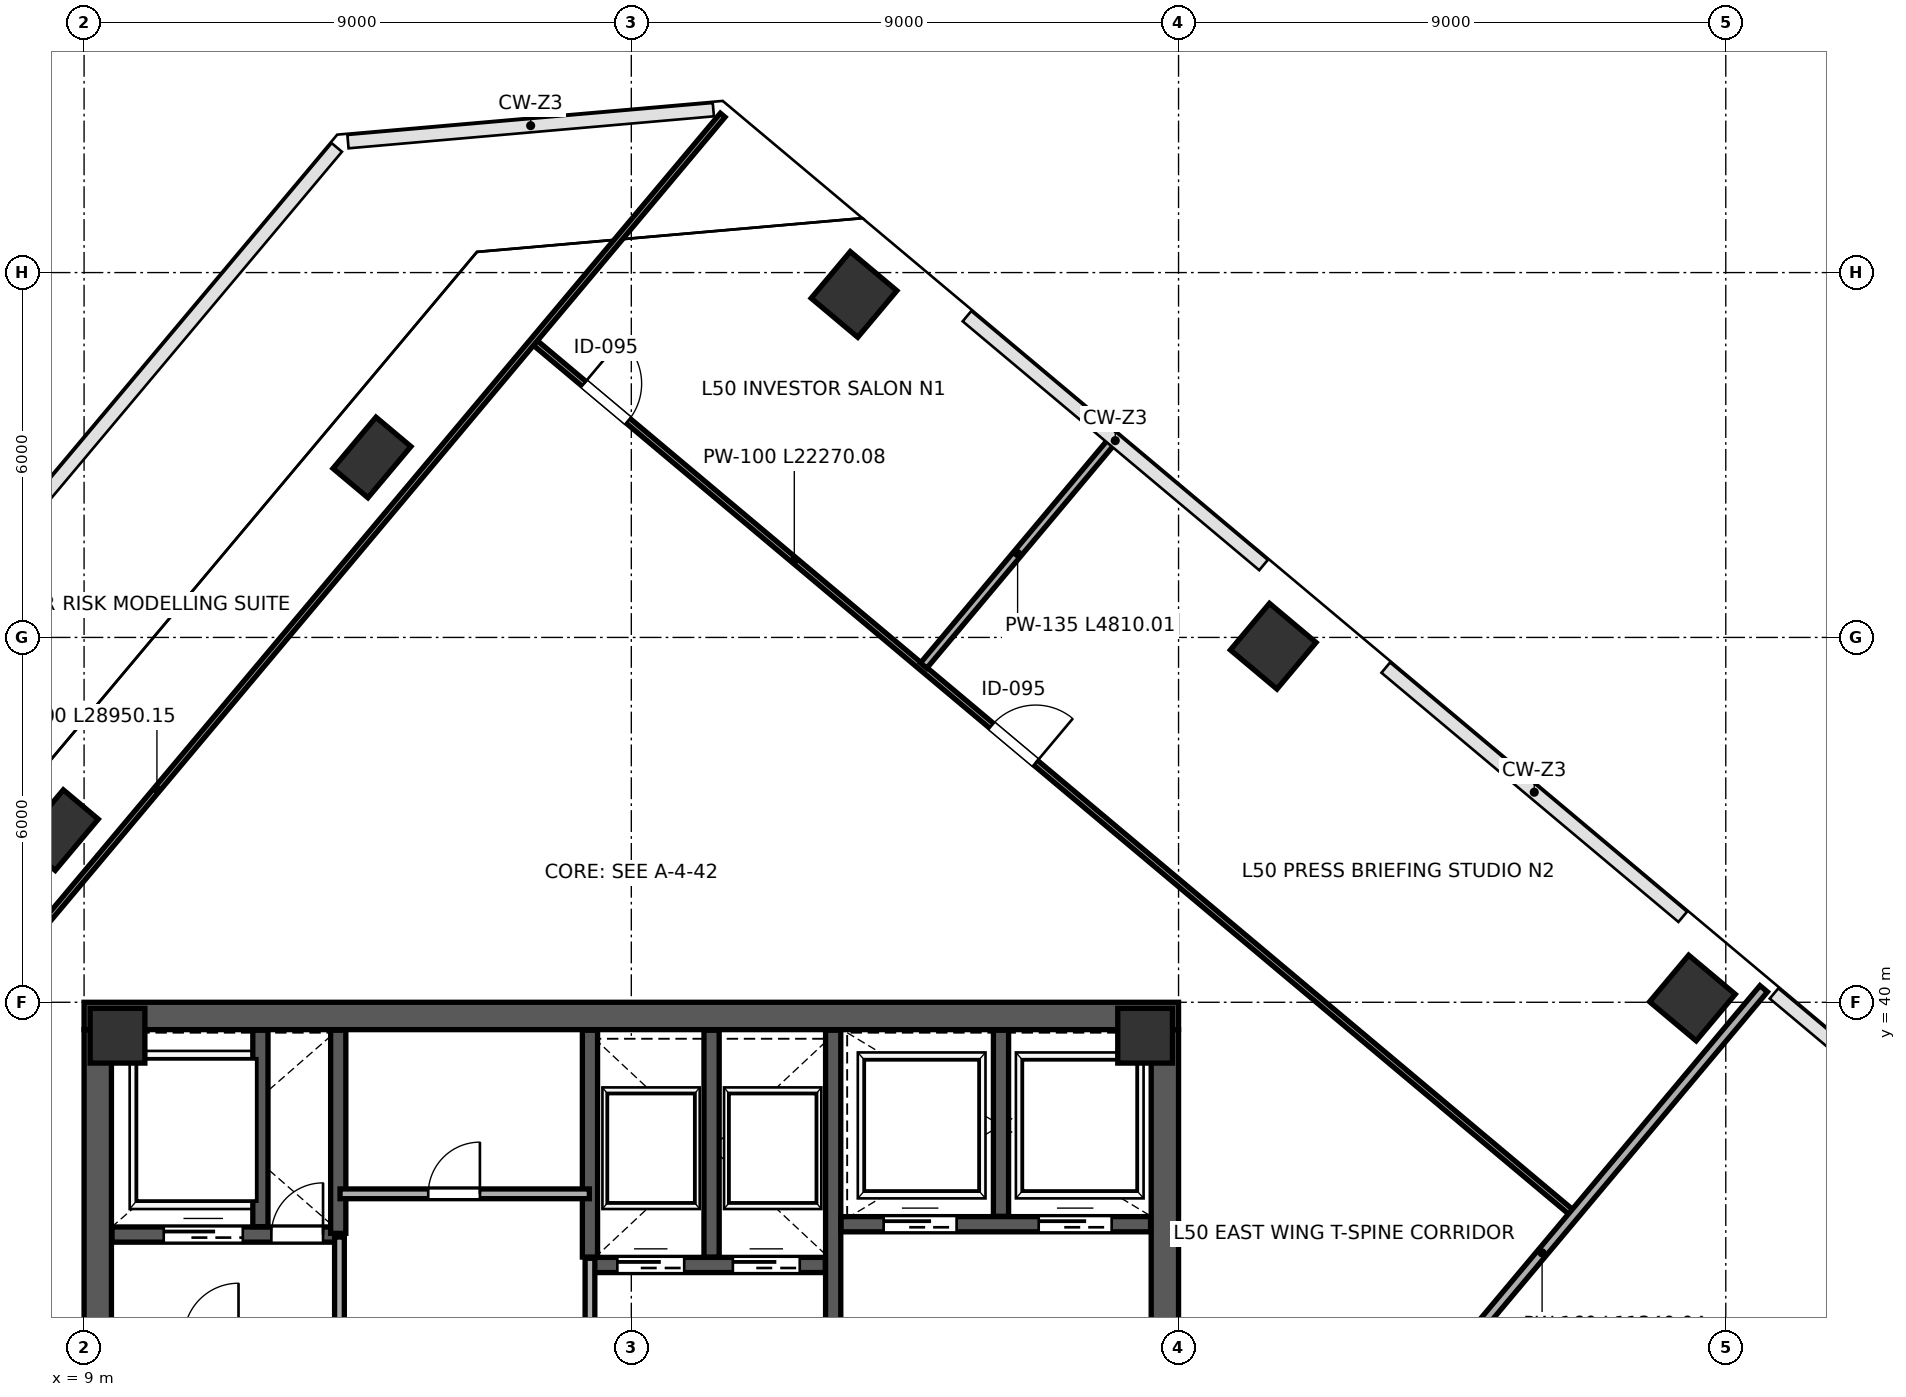
"""IFC4 building model, lengths in metres.
Left out: names, types, materials, properties, quantities, classifications, styles, units other than length and angle.
Written with IfcOpenShell. Run it as: python <this file> out.ifc"""

import sys

from ifc_helpers import new_model, si_unit, direction, frame, frame_2d, origin, origin_2d, place, context, subcontext, project, spatial, rectangle, extrude, clip, halfspace, source, transform, mapped, element, fill, save


model = new_model("IFC4")
c1 = context("Model", 3, precision=1e-05, world=origin(), true_north=direction((0.0, 1.0)))
c2 = subcontext(c1, "Body", "Model", "MODEL_VIEW")
j1 = project(units=[si_unit("LENGTHUNIT", "METRE"), si_unit("PLANEANGLEUNIT", "RADIAN")], contexts=[c1])
p1 = place(None, origin())
s1 = spatial("IfcSite", under=j1, at=p1, CompositionType="ELEMENT")
p2 = place(p1, origin())
s2 = spatial("IfcBuilding", under=s1, at=p2, CompositionType="ELEMENT")
p3 = place(p2, frame((0.0, 0.0, 224.8)))
s3 = spatial("IfcBuildingStorey", under=s2, at=p3, CompositionType="ELEMENT", Elevation=224.8)
m1 = source(origin(), c2, "Body", "SweptSolid", [
    extrude(rectangle(XDim=0.9, YDim=0.9, at=origin_2d()), origin(), (0.0, 0.0, 1.0), 4.198),
])
for number, where, z_axis, x_axis in (
    (1, (9.55, 39.45, 0.001), (0.0, 0.0, 1.0), (1.0, 0.0, 0.0)),
    (2, (26.45, 39.45, 0.001), (0.0, 0.0, 1.0), (1.0, 0.0, 0.0)),
):
    element("IfcColumn", number, at=place(p3, frame(where, z_axis=z_axis, x_axis=x_axis)), inside=s3, PredefinedType="COLUMN", context=c2, shape_type="MappedRepresentation", body=[
        mapped(m1, transform((0.0, 0.0, 0.0), scale=1.0)),
    ])
p4 = place(p3, frame((21.663, 51.64, 0.0), z_axis=(0.199857053228, -0.006037289154, 0.979806465285), x_axis=(-0.652650442084, -0.74667859259, 0.128524238241)))
e3 = element("IfcColumn", 3, at=p4, inside=s3, PredefinedType="COLUMN", context=c2, shape_type="Clipping", body=[
    clip(clip(extrude(rectangle(XDim=1.0, YDim=1.0, at=origin_2d()), origin(), (0.0, 0.0, 1.0), 4.287), halfspace(frame((0.0, 0.0, 0.145), z_axis=(0.0, 0.0, -1.0), x_axis=(1.0, 0.0, 0.0)), False)), halfspace(frame((0.0, 0.0, 4.142), z_axis=(0.0, 0.0, 1.0), x_axis=(1.0, 0.0, 0.0)), False)),
])
p5 = place(p3, frame((28.557, 45.855, 0.0), z_axis=(0.140479821095, -0.0754619954, 0.987203579367), x_axis=(-0.921521408534, -0.374555209537, 0.102502139601)))
e4 = element("IfcColumn", 4, at=p5, inside=s3, PredefinedType="COLUMN", context=c2, shape_type="Clipping", body=[
    clip(clip(extrude(rectangle(XDim=1.0, YDim=1.0, at=origin_2d()), origin(), (0.0, 0.0, 1.0), 4.254), halfspace(frame((0.0, 0.0, 0.115), z_axis=(0.0, 0.0, -1.0), x_axis=(1.0, 0.0, 0.0)), False)), halfspace(frame((0.0, 0.0, 4.14), z_axis=(0.0, 0.0, 1.0), x_axis=(1.0, 0.0, 0.0)), False)),
])
p6 = place(p3, frame((35.451, 40.07, 0.0), z_axis=(0.079575811303, -0.144704141015, 0.986269943691), x_axis=(-0.976727213265, 0.186375919699, 0.106150682633)))
e5 = element("IfcColumn", 5, at=p6, inside=s3, PredefinedType="COLUMN", context=c2, shape_type="Clipping", body=[
    clip(clip(extrude(rectangle(XDim=1.0, YDim=1.0, at=origin_2d()), origin(), (0.0, 0.0, 1.0), 4.258), halfspace(frame((0.0, 0.0, 0.119), z_axis=(0.0, 0.0, -1.0), x_axis=(1.0, 0.0, 0.0)), False)), halfspace(frame((0.0, 0.0, 4.14), z_axis=(0.0, 0.0, 1.0), x_axis=(1.0, 0.0, 0.0)), False)),
])
p7 = place(p3, frame((8.592, 42.831, 0.0), z_axis=(0.113659068215, 0.129634322639, 0.985026171534), x_axis=(0.158585881385, -0.98110626756, 0.110819718375)))
e6 = element("IfcColumn", 6, at=p7, inside=s3, PredefinedType="PILASTER", context=c2, shape_type="Clipping", body=[
    clip(clip(extrude(rectangle(XDim=0.75, YDim=1.1, at=origin_2d()), origin(), (0.0, 0.0, 1.0), 4.264), halfspace(frame((0.0, 0.0, 0.117), z_axis=(0.0, 0.0, -1.0), x_axis=(1.0, 0.0, 0.0)), False)), halfspace(frame((0.0, 0.0, 4.147), z_axis=(0.0, 0.0, 1.0), x_axis=(1.0, 0.0, 0.0)), False)),
])
p8 = place(p3, frame((13.735, 48.959, 0.0), z_axis=(0.174627926851, 0.075443829836, 0.981739943011), x_axis=(-0.27548877962, -0.953495918212, 0.122276188427)))
e7 = element("IfcColumn", 7, at=p8, inside=s3, PredefinedType="PILASTER", context=c2, shape_type="Clipping", body=[
    clip(clip(extrude(rectangle(XDim=0.75, YDim=1.1, at=origin_2d()), origin(), (0.0, 0.0, 1.0), 4.278), halfspace(frame((0.0, 0.0, 0.129), z_axis=(0.0, 0.0, -1.0), x_axis=(1.0, 0.0, 0.0)), False)), halfspace(frame((0.0, 0.0, 4.149), z_axis=(0.0, 0.0, 1.0), x_axis=(1.0, 0.0, 0.0)), False)),
])
p9 = place(p3, frame((9.225, 24.45, 0.0), z_axis=(0.0, 0.0, 1.0), x_axis=(0.0, 1.0, 0.0)))
e8 = element("IfcWall", 8, at=p9, inside=s3, PredefinedType="SHEAR", context=c2, shape_type="SweptSolid", body=[
    extrude(rectangle(XDim=15.1, YDim=0.45, at=frame_2d((7.55, 0.0))), origin(), (0.0, 0.0, 1.0), 3.96),
])
p10 = place(p9, frame((8.7, 0.0, 0.0)))
e9 = element("IfcOpeningElement", 9, at=p10, cuts=e8, PredefinedType="OPENING", context=c2, shape_type="SweptSolid", body=[
    extrude(rectangle(XDim=1.15, YDim=2.2, at=frame_2d((0.575, 1.1))), frame((0.0, 0.235, 0.0), z_axis=(0.0, -1.0, 0.0), x_axis=(1.0, 0.0, 0.0)), (0.0, 0.0, 1.0), 0.47),
])
p11 = place(p3, frame((26.775, 24.45, 0.0), z_axis=(0.0, 0.0, 1.0), x_axis=(0.0, 1.0, 0.0)))
e10 = element("IfcWall", 10, at=p11, inside=s3, PredefinedType="SHEAR", context=c2, shape_type="SweptSolid", body=[
    extrude(rectangle(XDim=15.1, YDim=0.45, at=frame_2d((7.55, 0.0))), origin(), (0.0, 0.0, 1.0), 3.96),
])
p12 = place(p11, frame((8.6, 0.0, 0.0)))
e11 = element("IfcOpeningElement", 11, at=p12, cuts=e10, PredefinedType="OPENING", context=c2, shape_type="SweptSolid", body=[
    extrude(rectangle(XDim=1.15, YDim=2.2, at=frame_2d((0.575, 1.1))), frame((0.0, 0.235, 0.0), z_axis=(0.0, -1.0, 0.0), x_axis=(1.0, 0.0, 0.0)), (0.0, 0.0, 1.0), 0.47),
])
p13 = place(p3, frame((9.0, 39.775, 0.0), z_axis=(0.0, 0.0, 1.0), x_axis=(1.0, 0.0, 0.0)))
e12 = element("IfcWall", 12, at=p13, inside=s3, PredefinedType="SHEAR", context=c2, shape_type="SweptSolid", body=[
    extrude(rectangle(XDim=18.0, YDim=0.45, at=frame_2d((9.0, 0.0))), origin(), (0.0, 0.0, 1.0), 3.96),
])
p14 = place(p3, frame((21.32, 32.12, 0.0), z_axis=(0.0, 0.0, 1.0), x_axis=(0.0, 1.0, 0.0)))
e13 = element("IfcWall", 13, at=p14, inside=s3, PredefinedType="SHEAR", context=c2, shape_type="SweptSolid", body=[
    extrude(rectangle(XDim=7.42, YDim=0.25, at=frame_2d((3.71, 0.0))), origin(), (0.0, 0.0, 1.0), 3.96),
])
p15 = place(p14, frame((1.4, 0.0, 0.0)))
e14 = element("IfcOpeningElement", 14, at=p15, cuts=e13, PredefinedType="OPENING", context=c2, shape_type="SweptSolid", body=[
    extrude(rectangle(XDim=1.15, YDim=2.2, at=frame_2d((0.575, 1.1))), frame((0.0, 0.135, 0.0), z_axis=(0.0, -1.0, 0.0), x_axis=(1.0, 0.0, 0.0)), (0.0, 0.0, 1.0), 0.27),
])
p16 = place(p3, frame((9.46, 36.18, 0.0), z_axis=(0.0, 0.0, 1.0), x_axis=(1.0, 0.0, 0.0)))
e15 = element("IfcWall", 15, at=p16, inside=s3, PredefinedType="SHEAR", context=c2, shape_type="SweptSolid", body=[
    extrude(rectangle(XDim=3.79, YDim=0.25, at=frame_2d((1.895, 0.0))), origin(), (0.0, 0.0, 1.0), 3.96),
])
p17 = place(p16, frame((2.62, 0.0, 0.0)))
e16 = element("IfcOpeningElement", 16, at=p17, cuts=e15, PredefinedType="OPENING", context=c2, shape_type="SweptSolid", body=[
    extrude(rectangle(XDim=0.85, YDim=2.1, at=frame_2d((0.425, 1.05))), frame((0.0, 0.135, 0.0), z_axis=(0.0, -1.0, 0.0), x_axis=(1.0, 0.0, 0.0)), (0.0, 0.0, 1.0), 0.27),
])
p18 = place(p16, frame((0.85, 0.0, 0.0)))
e17 = element("IfcOpeningElement", 17, at=p18, cuts=e15, PredefinedType="OPENING", context=c2, shape_type="SweptSolid", body=[
    extrude(rectangle(XDim=1.3, YDim=2.25, at=frame_2d((0.65, 1.125))), frame((0.0, 0.135, 0.0), z_axis=(0.0, -1.0, 0.0), x_axis=(1.0, 0.0, 0.0)), (0.0, 0.0, 1.0), 0.27),
])
p19 = place(p3, frame((11.9, 36.31, 0.0), z_axis=(0.0, 0.0, 1.0), x_axis=(0.0, 1.0, 0.0)))
e18 = element("IfcWall", 18, at=p19, inside=s3, PredefinedType="SHEAR", context=c2, shape_type="SweptSolid", body=[
    extrude(rectangle(XDim=3.23, YDim=0.25, at=frame_2d((1.615, 0.0))), origin(), (0.0, 0.0, 1.0), 3.96),
])
p20 = place(p3, frame((21.45, 36.35, 0.0), z_axis=(0.0, 0.0, 1.0), x_axis=(1.0, 0.0, 0.0)))
e19 = element("IfcWall", 19, at=p20, inside=s3, PredefinedType="SHEAR", context=c2, shape_type="SweptSolid", body=[
    extrude(rectangle(XDim=5.09, YDim=0.25, at=frame_2d((2.545, 0.0))), origin(), (0.0, 0.0, 1.0), 3.96),
])
p21 = place(p20, frame((0.7, 0.0, 0.0)))
e20 = element("IfcOpeningElement", 20, at=p21, cuts=e19, PredefinedType="OPENING", context=c2, shape_type="SweptSolid", body=[
    extrude(rectangle(XDim=1.2, YDim=2.2, at=frame_2d((0.6, 1.1))), frame((0.0, 0.135, 0.0), z_axis=(0.0, -1.0, 0.0), x_axis=(1.0, 0.0, 0.0)), (0.0, 0.0, 1.0), 0.27),
])
p22 = place(p20, frame((3.25, 0.0, 0.0)))
e21 = element("IfcOpeningElement", 21, at=p22, cuts=e19, PredefinedType="OPENING", context=c2, shape_type="SweptSolid", body=[
    extrude(rectangle(XDim=1.2, YDim=2.2, at=frame_2d((0.6, 1.1))), frame((0.0, 0.135, 0.0), z_axis=(0.0, -1.0, 0.0), x_axis=(1.0, 0.0, 0.0)), (0.0, 0.0, 1.0), 0.27),
])
p23 = place(p3, frame((24.08, 36.48, 0.0), z_axis=(0.0, 0.0, 1.0), x_axis=(0.0, 1.0, 0.0)))
e22 = element("IfcWall", 22, at=p23, inside=s3, PredefinedType="SHEAR", context=c2, shape_type="SweptSolid", body=[
    extrude(rectangle(XDim=3.06, YDim=0.25, at=frame_2d((1.53, 0.0))), origin(), (0.0, 0.0, 1.0), 3.96),
])
p24 = place(p3, frame((13.18, 36.2, 0.0), z_axis=(0.0, 0.0, 1.0), x_axis=(0.0, 1.0, 0.0)))
e23 = element("IfcWall", 23, at=p24, inside=s3, PredefinedType="SHEAR", context=c2, shape_type="SweptSolid", body=[
    extrude(rectangle(XDim=3.34, YDim=0.25, at=frame_2d((1.67, 0.0))), origin(), (0.0, 0.0, 1.0), 3.96),
])
p25 = place(p3, frame((17.32, 35.68, 0.0), z_axis=(0.0, 0.0, 1.0), x_axis=(1.0, 0.0, 0.0)))
e24 = element("IfcWall", 24, at=p25, inside=s3, PredefinedType="SHEAR", context=c2, shape_type="SweptSolid", body=[
    extrude(rectangle(XDim=3.87, YDim=0.25, at=frame_2d((1.935, 0.0))), origin(), (0.0, 0.0, 1.0), 3.96),
])
p26 = place(p25, frame((0.45, 0.0, 0.0)))
e25 = element("IfcOpeningElement", 25, at=p26, cuts=e24, PredefinedType="OPENING", context=c2, shape_type="SweptSolid", body=[
    extrude(rectangle(XDim=1.1, YDim=2.2, at=frame_2d((0.55, 1.1))), frame((0.0, 0.135, 0.0), z_axis=(0.0, -1.0, 0.0), x_axis=(1.0, 0.0, 0.0)), (0.0, 0.0, 1.0), 0.27),
])
p27 = place(p25, frame((2.35, 0.0, 0.0)))
e26 = element("IfcOpeningElement", 26, at=p27, cuts=e24, PredefinedType="OPENING", context=c2, shape_type="SweptSolid", body=[
    extrude(rectangle(XDim=1.1, YDim=2.2, at=frame_2d((0.55, 1.1))), frame((0.0, 0.135, 0.0), z_axis=(0.0, -1.0, 0.0), x_axis=(1.0, 0.0, 0.0)), (0.0, 0.0, 1.0), 0.27),
])
for number, where, z_axis, x_axis in (
    (27, (17.32, 35.81, 0.0), (0.0, 0.0, 1.0), (0.0, 1.0, 0.0)),
    (28, (19.32, 35.81, 0.0), (0.0, 0.0, 1.0), (0.0, 1.0, 0.0)),
):
    element("IfcWall", number, at=place(p3, frame(where, z_axis=z_axis, x_axis=x_axis)), inside=s3, PredefinedType="SHEAR", context=c2, shape_type="SweptSolid", body=[
        extrude(rectangle(XDim=3.73, YDim=0.25, at=frame_2d((1.865, 0.0))), origin(), (0.0, 0.0, 1.0), 3.96),
    ])
p28 = place(p3, frame((13.2, 34.57, 0.0), z_axis=(0.0, 0.0, 1.0), x_axis=(0.0, 1.0, 0.0)))
e29 = element("IfcWall", 29, at=p28, inside=s3, PredefinedType="PARTITIONING", context=c2, shape_type="SweptSolid", body=[
    extrude(rectangle(XDim=1.57, YDim=0.16, at=frame_2d((0.785, 0.0))), origin(), (0.0, 0.0, 1.0), 3.96),
])
p29 = place(p3, frame((17.32, 33.86, 0.0), z_axis=(0.0, 0.0, 1.0), x_axis=(0.0, 1.0, 0.0)))
e30 = element("IfcWall", 30, at=p29, inside=s3, PredefinedType="PARTITIONING", context=c2, shape_type="SweptSolid", body=[
    extrude(rectangle(XDim=1.93, YDim=0.16, at=frame_2d((0.965, 0.0))), origin(), (0.0, 0.0, 1.0), 3.96),
])
p30 = place(p3, frame((13.21, 36.85, 0.0), z_axis=(0.0, 0.0, 1.0), x_axis=(1.0, 0.0, 0.0)))
e31 = element("IfcWall", 31, at=p30, inside=s3, PredefinedType="PARTITIONING", context=c2, shape_type="SweptSolid", body=[
    extrude(rectangle(XDim=4.1, YDim=0.16, at=frame_2d((2.05, 0.0))), origin(), (0.0, 0.0, 1.0), 3.96),
])
p31 = place(p30, frame((1.45, 0.0, 0.0)))
e32 = element("IfcOpeningElement", 32, at=p31, cuts=e31, PredefinedType="OPENING", context=c2, shape_type="SweptSolid", body=[
    extrude(rectangle(XDim=0.85, YDim=2.1, at=frame_2d((0.425, 1.05))), frame((0.0, 0.09, 0.0), z_axis=(0.0, -1.0, 0.0), x_axis=(1.0, 0.0, 0.0)), (0.0, 0.0, 1.0), 0.18),
])
p32 = place(p3, frame((16.416, 50.848, 0.0), z_axis=(0.0, 0.0, 1.0), x_axis=(0.766043174175, -0.642789121951, 0.0)))
e33 = element("IfcWall", 33, at=p32, inside=s3, PredefinedType="PARTITIONING", context=c2, shape_type="SweptSolid", body=[
    extrude(rectangle(XDim=22.27, YDim=0.1, at=frame_2d((11.135, 0.0))), origin(), (0.0, 0.0, 1.0), 3.96),
])
p33 = place(p32, frame((1.05, 0.0, 0.0)))
e34 = element("IfcOpeningElement", 34, at=p33, cuts=e33, PredefinedType="OPENING", context=c2, shape_type="SweptSolid", body=[
    extrude(rectangle(XDim=0.95, YDim=2.15, at=frame_2d((0.475, 1.075))), frame((0.0, 0.06, 0.0), z_axis=(0.0, -1.0, 0.0), x_axis=(1.0, 0.0, 0.0)), (0.0, 0.0, 1.0), 0.12),
])
p34 = place(p32, frame((9.8, 0.0, 0.0)))
e35 = element("IfcOpeningElement", 35, at=p34, cuts=e33, PredefinedType="OPENING", context=c2, shape_type="SweptSolid", body=[
    extrude(rectangle(XDim=0.95, YDim=2.15, at=frame_2d((0.475, 1.075))), frame((0.0, 0.06, 0.0), z_axis=(0.0, -1.0, 0.0), x_axis=(1.0, 0.0, 0.0)), (0.0, 0.0, 1.0), 0.12),
])
p35 = place(p3, frame((22.807, 45.537, 0.0), z_axis=(0.0, 0.0, 1.0), x_axis=(0.642796794607, 0.766036735961, 0.0)))
e36 = element("IfcWall", 36, at=p35, inside=s3, PredefinedType="PARTITIONING", context=c2, shape_type="SweptSolid", body=[
    extrude(rectangle(XDim=4.81, YDim=0.135, at=frame_2d((2.405, 0.0))), origin(), (0.0, 0.0, 1.0), 3.195),
])
p36 = place(p3, frame((0.894, 32.412, 0.0), z_axis=(0.0, 0.0, 1.0), x_axis=(0.642782006196, 0.766049144971, 0.0)))
e37 = element("IfcWall", 37, at=p36, inside=s3, PredefinedType="PARTITIONING", context=c2, shape_type="SweptSolid", body=[
    extrude(rectangle(XDim=28.95, YDim=0.1, at=frame_2d((14.475, 0.0))), origin(), (0.0, 0.0, 1.0), 3.96),
])
p37 = place(p36, frame((2.2, 0.0, 0.0)))
e38 = element("IfcOpeningElement", 38, at=p37, cuts=e37, PredefinedType="OPENING", context=c2, shape_type="SweptSolid", body=[
    extrude(rectangle(XDim=0.95, YDim=2.15, at=frame_2d((0.475, 1.075))), frame((0.0, 0.06, 0.0), z_axis=(0.0, -1.0, 0.0), x_axis=(1.0, 0.0, 0.0)), (0.0, 0.0, 1.0), 0.12),
])
p38 = place(p3, frame((29.334, 31.535, 0.0), z_axis=(0.0, 0.0, 1.0), x_axis=(0.642789592208, 0.766042779581, 0.0)))
e39 = element("IfcWall", 39, at=p38, inside=s3, PredefinedType="PARTITIONING", context=c2, shape_type="SweptSolid", body=[
    extrude(rectangle(XDim=11.34, YDim=0.16, at=frame_2d((5.67, 0.0))), origin(), (0.0, 0.0, 1.0), 3.195),
])
m2 = source(origin(), c2, "Body", "SweptSolid", [
    extrude(rectangle(XDim=0.85, YDim=2.1, at=frame_2d((0.425, 1.05))), frame((0.0, 0.025, 0.0), z_axis=(0.0, -1.0, 0.0), x_axis=(1.0, 0.0, 0.0)), (0.0, 0.0, 1.0), 0.05),
])
p39 = place(p17, origin())
e40 = element("IfcDoor", 40, at=p39, inside=s3, OperationType="SINGLE_SWING_RIGHT", PredefinedType="DOOR", context=c2, shape_type="MappedRepresentation", body=[
    mapped(m2, transform((0.0, 0.0, 0.0), scale=1.0)),
])
fill(e16, e40)
m3 = source(origin(), c2, "Body", "SweptSolid", [
    extrude(rectangle(XDim=1.1, YDim=2.2, at=frame_2d((0.55, 1.1))), frame((0.0, 0.025, 0.0), z_axis=(0.0, -1.0, 0.0), x_axis=(1.0, 0.0, 0.0)), (0.0, 0.0, 1.0), 0.05),
])
p40 = place(p26, origin())
e41 = element("IfcDoor", 41, at=p40, inside=s3, OperationType="SLIDING_TO_LEFT", PredefinedType="DOOR", context=c2, shape_type="MappedRepresentation", body=[
    mapped(m3, transform((0.0, 0.0, 0.0), scale=1.0)),
])
fill(e25, e41)
p41 = place(p27, origin())
e42 = element("IfcDoor", 42, at=p41, inside=s3, OperationType="SLIDING_TO_RIGHT", PredefinedType="DOOR", context=c2, shape_type="MappedRepresentation", body=[
    mapped(m3, transform((0.0, 0.0, 0.0), scale=1.0)),
])
fill(e26, e42)
m4 = source(origin(), c2, "Body", "SweptSolid", [
    extrude(rectangle(XDim=1.2, YDim=2.2, at=frame_2d((0.6, 1.1))), frame((0.0, 0.025, 0.0), z_axis=(0.0, -1.0, 0.0), x_axis=(1.0, 0.0, 0.0)), (0.0, 0.0, 1.0), 0.05),
])
p42 = place(p21, origin())
e43 = element("IfcDoor", 43, at=p42, inside=s3, OperationType="SLIDING_TO_LEFT", PredefinedType="DOOR", context=c2, shape_type="MappedRepresentation", body=[
    mapped(m4, transform((0.0, 0.0, 0.0), scale=1.0)),
])
fill(e20, e43)
p43 = place(p22, origin())
e44 = element("IfcDoor", 44, at=p43, inside=s3, OperationType="SLIDING_TO_RIGHT", PredefinedType="DOOR", context=c2, shape_type="MappedRepresentation", body=[
    mapped(m4, transform((0.0, 0.0, 0.0), scale=1.0)),
])
fill(e21, e44)
m5 = source(origin(), c2, "Body", "SweptSolid", [
    extrude(rectangle(XDim=1.3, YDim=2.25, at=frame_2d((0.65, 1.125))), frame((0.0, 0.025, 0.0), z_axis=(0.0, -1.0, 0.0), x_axis=(1.0, 0.0, 0.0)), (0.0, 0.0, 1.0), 0.05),
])
p44 = place(p18, origin())
e45 = element("IfcDoor", 45, at=p44, inside=s3, OperationType="SLIDING_TO_LEFT", PredefinedType="DOOR", context=c2, shape_type="MappedRepresentation", body=[
    mapped(m5, transform((0.0, 0.0, 0.0), scale=1.0)),
])
fill(e17, e45)
p45 = place(p31, origin())
e46 = element("IfcDoor", 46, at=p45, inside=s3, OperationType="SINGLE_SWING_RIGHT", PredefinedType="DOOR", context=c2, shape_type="MappedRepresentation", body=[
    mapped(m2, transform((0.0, 0.0, 0.0), scale=1.0)),
])
fill(e32, e46)
m6 = source(origin(), c2, "Body", "SweptSolid", [
    extrude(rectangle(XDim=0.95, YDim=2.15, at=frame_2d((0.475, 1.075))), frame((0.0, 0.025, 0.0), z_axis=(0.0, -1.0, 0.0), x_axis=(1.0, 0.0, 0.0)), (0.0, 0.0, 1.0), 0.05),
])
p46 = place(p33, origin())
e47 = element("IfcDoor", 47, at=p46, inside=s3, OperationType="SINGLE_SWING_LEFT", PredefinedType="DOOR", context=c2, shape_type="MappedRepresentation", body=[
    mapped(m6, transform((0.0, 0.0, 0.0), scale=1.0)),
])
fill(e34, e47)
p47 = place(p34, origin())
e48 = element("IfcDoor", 48, at=p47, inside=s3, OperationType="SINGLE_SWING_RIGHT", PredefinedType="DOOR", context=c2, shape_type="MappedRepresentation", body=[
    mapped(m6, transform((0.0, 0.0, 0.0), scale=1.0)),
])
fill(e35, e48)
save(model, sys.argv[1])
